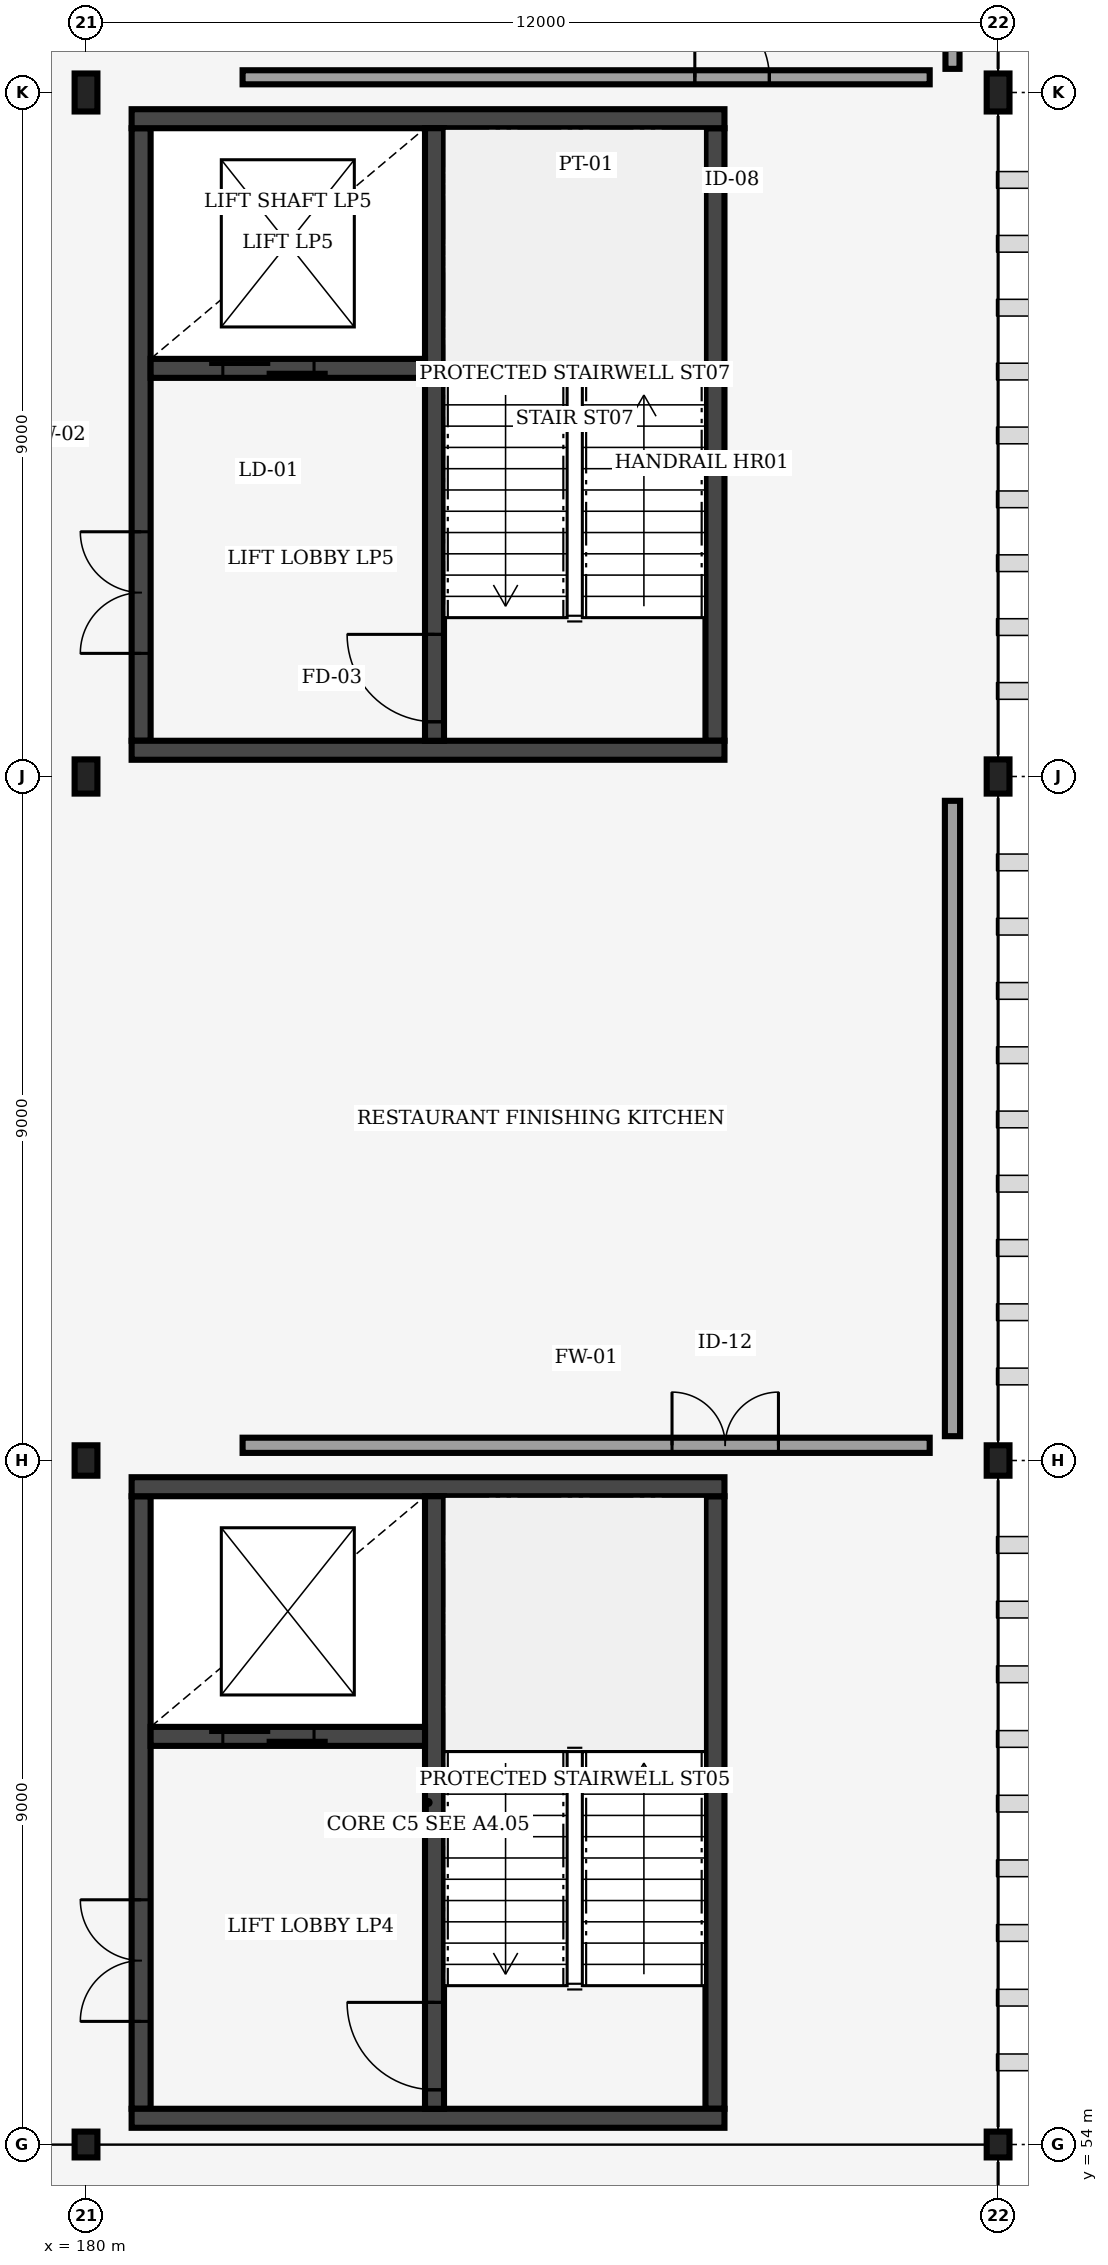
"""IFC4 building model, lengths in metres.
Left out: names, types, materials, properties, quantities, classifications, styles, units other than length and angle.
Written with IfcOpenShell. Run it as: python <this file> out.ifc"""

import sys

from ifc_helpers import new_model, si_unit, direction, frame, frame_2d, origin, origin_2d, place, context, subcontext, project, spatial, rectangle, i_section, extrude, element, fill, save


model = new_model("IFC4")
c1 = context("Model", 3, precision=1e-05, world=origin(), true_north=direction((0.0, 1.0)))
c2 = subcontext(c1, "Body", "Model", "MODEL_VIEW")
j1 = project(units=[si_unit("LENGTHUNIT", "METRE"), si_unit("PLANEANGLEUNIT", "RADIAN")], contexts=[c1])
p1 = place(None, origin())
s1 = spatial("IfcSite", under=j1, at=p1, CompositionType="ELEMENT")
p2 = place(p1, origin())
s2 = spatial("IfcBuilding", under=s1, at=p2, CompositionType="ELEMENT")
p3 = place(p2, frame((0.0, 0.0, 22.8)))
s3 = spatial("IfcBuildingStorey", under=s2, at=p3, CompositionType="ELEMENT", Elevation=22.8)
p4 = place(p3, frame((180.0, 54.0, 0.0), z_axis=(0.0, 0.0, 1.0), x_axis=(1.0, 0.0, 0.0)))
e1 = element("IfcColumn", 1, at=p4, inside=s3, PredefinedType="COLUMN", context=c2, shape_type="SweptSolid", body=[
    extrude(i_section(OverallWidth=0.3, OverallDepth=0.34, WebThickness=0.012, FlangeThickness=0.021, FilletRadius=0.027, at=origin_2d()), origin(), (0.0, 0.0, 1.0), 4.0),
])
p5 = place(p3, frame((180.0, 63.0, 0.0), z_axis=(0.0, 0.0, 1.0), x_axis=(1.0, 0.0, 0.0)))
e2 = element("IfcColumn", 2, at=p5, inside=s3, PredefinedType="COLUMN", context=c2, shape_type="SweptSolid", body=[
    extrude(i_section(OverallWidth=0.3, OverallDepth=0.4, WebThickness=0.013, FlangeThickness=0.024, FilletRadius=0.027, at=origin_2d()), origin(), (0.0, 0.0, 1.0), 4.0),
])
p6 = place(p3, frame((180.0, 72.0, 0.0), z_axis=(0.0, 0.0, 1.0), x_axis=(1.0, 0.0, 0.0)))
e3 = element("IfcColumn", 3, at=p6, inside=s3, PredefinedType="COLUMN", context=c2, shape_type="SweptSolid", body=[
    extrude(i_section(OverallWidth=0.3, OverallDepth=0.45, WebThickness=0.014, FlangeThickness=0.026, FilletRadius=0.027, at=origin_2d()), origin(), (0.0, 0.0, 1.0), 4.0),
])
p7 = place(p3, frame((180.0, 81.0, 0.0), z_axis=(0.0, 0.0, 1.0), x_axis=(1.0, 0.0, 0.0)))
e4 = element("IfcColumn", 4, at=p7, inside=s3, PredefinedType="COLUMN", context=c2, shape_type="SweptSolid", body=[
    extrude(i_section(OverallWidth=0.3, OverallDepth=0.5, WebThickness=0.014, FlangeThickness=0.028, FilletRadius=0.027, at=origin_2d()), origin(), (0.0, 0.0, 1.0), 4.0),
])
p8 = place(p3, frame((192.0, 54.0, 0.0), z_axis=(0.0, 0.0, 1.0), x_axis=(1.0, 0.0, 0.0)))
e5 = element("IfcColumn", 5, at=p8, inside=s3, PredefinedType="COLUMN", context=c2, shape_type="SweptSolid", body=[
    extrude(i_section(OverallWidth=0.3, OverallDepth=0.34, WebThickness=0.012, FlangeThickness=0.021, FilletRadius=0.027, at=origin_2d()), origin(), (0.0, 0.0, 1.0), 4.0),
])
p9 = place(p3, frame((192.0, 63.0, 0.0), z_axis=(0.0, 0.0, 1.0), x_axis=(1.0, 0.0, 0.0)))
e6 = element("IfcColumn", 6, at=p9, inside=s3, PredefinedType="COLUMN", context=c2, shape_type="SweptSolid", body=[
    extrude(i_section(OverallWidth=0.3, OverallDepth=0.4, WebThickness=0.013, FlangeThickness=0.024, FilletRadius=0.027, at=origin_2d()), origin(), (0.0, 0.0, 1.0), 4.0),
])
p10 = place(p3, frame((192.0, 72.0, 0.0), z_axis=(0.0, 0.0, 1.0), x_axis=(1.0, 0.0, 0.0)))
e7 = element("IfcColumn", 7, at=p10, inside=s3, PredefinedType="COLUMN", context=c2, shape_type="SweptSolid", body=[
    extrude(i_section(OverallWidth=0.3, OverallDepth=0.45, WebThickness=0.014, FlangeThickness=0.026, FilletRadius=0.027, at=origin_2d()), origin(), (0.0, 0.0, 1.0), 4.0),
])
p11 = place(p3, frame((192.0, 81.0, 0.0), z_axis=(0.0, 0.0, 1.0), x_axis=(1.0, 0.0, 0.0)))
e8 = element("IfcColumn", 8, at=p11, inside=s3, PredefinedType="COLUMN", context=c2, shape_type="SweptSolid", body=[
    extrude(i_section(OverallWidth=0.3, OverallDepth=0.5, WebThickness=0.014, FlangeThickness=0.028, FilletRadius=0.027, at=origin_2d()), origin(), (0.0, 0.0, 1.0), 4.0),
])
p12 = place(p3, frame((180.725, 54.47, 0.0), z_axis=(0.0, 0.0, 1.0), x_axis=(0.0, 1.0, 0.0)))
e9 = element("IfcWall", 9, at=p12, inside=s3, PredefinedType="SHEAR", context=c2, shape_type="SweptSolid", body=[
    extrude(rectangle(XDim=8.06, YDim=0.25, at=frame_2d((4.03, 0.0))), origin(), (0.0, 0.0, 1.0), 3.64),
])
p13 = place(p12, frame((1.15, 0.0, 0.0)))
e10 = element("IfcOpeningElement", 10, at=p13, cuts=e9, PredefinedType="OPENING", context=c2, shape_type="SweptSolid", body=[
    extrude(rectangle(XDim=1.6, YDim=2.2, at=frame_2d((0.8, 1.1))), frame((0.0, 0.135, 0.0), z_axis=(0.0, -1.0, 0.0), x_axis=(1.0, 0.0, 0.0)), (0.0, 0.0, 1.0), 0.27),
])
p14 = place(p3, frame((188.275, 54.47, 0.0), z_axis=(0.0, 0.0, 1.0), x_axis=(0.0, 1.0, 0.0)))
e11 = element("IfcWall", 11, at=p14, inside=s3, PredefinedType="SHEAR", context=c2, shape_type="SweptSolid", body=[
    extrude(rectangle(XDim=8.06, YDim=0.25, at=frame_2d((4.03, 0.0))), origin(), (0.0, 0.0, 1.0), 3.64),
])
for number, where, z_axis, x_axis in (
    (12, (180.6, 54.345, 0.0), (0.0, 0.0, 1.0), (1.0, 0.0, 0.0)),
    (13, (180.6, 62.655, 0.0), (0.0, 0.0, 1.0), (1.0, 0.0, 0.0)),
):
    element("IfcWall", number, at=place(p3, frame(where, z_axis=z_axis, x_axis=x_axis)), inside=s3, PredefinedType="SHEAR", context=c2, shape_type="SweptSolid", body=[
        extrude(rectangle(XDim=7.8, YDim=0.25, at=frame_2d((3.9, 0.0))), origin(), (0.0, 0.0, 1.0), 3.64),
    ])
p15 = place(p3, frame((184.585, 54.47, 0.0), z_axis=(0.0, 0.0, 1.0), x_axis=(0.0, 1.0, 0.0)))
e14 = element("IfcWall", 14, at=p15, inside=s3, PredefinedType="SHEAR", context=c2, shape_type="SweptSolid", body=[
    extrude(rectangle(XDim=8.06, YDim=0.25, at=frame_2d((4.03, 0.0))), origin(), (0.0, 0.0, 1.0), 3.64),
])
p16 = place(p15, frame((0.25, 0.0, 0.0)))
e15 = element("IfcOpeningElement", 15, at=p16, cuts=e14, PredefinedType="OPENING", context=c2, shape_type="SweptSolid", body=[
    extrude(rectangle(XDim=1.15, YDim=2.15, at=frame_2d((0.575, 1.075))), frame((0.0, 0.135, 0.0), z_axis=(0.0, -1.0, 0.0), x_axis=(1.0, 0.0, 0.0)), (0.0, 0.0, 1.0), 0.27),
])
p17 = place(p3, frame((180.85, 59.37, 0.0), z_axis=(0.0, 0.0, 1.0), x_axis=(1.0, 0.0, 0.0)))
e16 = element("IfcWall", 16, at=p17, inside=s3, PredefinedType="SHEAR", context=c2, shape_type="SweptSolid", body=[
    extrude(rectangle(XDim=3.61, YDim=0.25, at=frame_2d((1.805, 0.0))), origin(), (0.0, 0.0, 1.0), 3.64),
])
p18 = place(p17, frame((0.95, 0.0, 0.0)))
e17 = element("IfcOpeningElement", 17, at=p18, cuts=e16, PredefinedType="OPENING", context=c2, shape_type="SweptSolid", body=[
    extrude(rectangle(XDim=1.2, YDim=2.2, at=frame_2d((0.6, 1.1))), frame((0.0, 0.135, 0.0), z_axis=(0.0, -1.0, 0.0), x_axis=(1.0, 0.0, 0.0)), (0.0, 0.0, 1.0), 0.27),
])
p19 = place(p3, frame((180.725, 72.47, 0.0), z_axis=(0.0, 0.0, 1.0), x_axis=(0.0, 1.0, 0.0)))
e18 = element("IfcWall", 18, at=p19, inside=s3, PredefinedType="SHEAR", context=c2, shape_type="SweptSolid", body=[
    extrude(rectangle(XDim=8.06, YDim=0.25, at=frame_2d((4.03, 0.0))), origin(), (0.0, 0.0, 1.0), 3.64),
])
p20 = place(p19, frame((1.15, 0.0, 0.0)))
e19 = element("IfcOpeningElement", 19, at=p20, cuts=e18, PredefinedType="OPENING", context=c2, shape_type="SweptSolid", body=[
    extrude(rectangle(XDim=1.6, YDim=2.2, at=frame_2d((0.8, 1.1))), frame((0.0, 0.135, 0.0), z_axis=(0.0, -1.0, 0.0), x_axis=(1.0, 0.0, 0.0)), (0.0, 0.0, 1.0), 0.27),
])
p21 = place(p3, frame((188.275, 72.47, 0.0), z_axis=(0.0, 0.0, 1.0), x_axis=(0.0, 1.0, 0.0)))
e20 = element("IfcWall", 20, at=p21, inside=s3, PredefinedType="SHEAR", context=c2, shape_type="SweptSolid", body=[
    extrude(rectangle(XDim=8.06, YDim=0.25, at=frame_2d((4.03, 0.0))), origin(), (0.0, 0.0, 1.0), 3.64),
])
for number, where, z_axis, x_axis in (
    (21, (180.6, 72.345, 0.0), (0.0, 0.0, 1.0), (1.0, 0.0, 0.0)),
    (22, (180.6, 80.655, 0.0), (0.0, 0.0, 1.0), (1.0, 0.0, 0.0)),
):
    element("IfcWall", number, at=place(p3, frame(where, z_axis=z_axis, x_axis=x_axis)), inside=s3, PredefinedType="SHEAR", context=c2, shape_type="SweptSolid", body=[
        extrude(rectangle(XDim=7.8, YDim=0.25, at=frame_2d((3.9, 0.0))), origin(), (0.0, 0.0, 1.0), 3.64),
    ])
p22 = place(p3, frame((184.585, 72.47, 0.0), z_axis=(0.0, 0.0, 1.0), x_axis=(0.0, 1.0, 0.0)))
e23 = element("IfcWall", 23, at=p22, inside=s3, PredefinedType="SHEAR", context=c2, shape_type="SweptSolid", body=[
    extrude(rectangle(XDim=8.06, YDim=0.25, at=frame_2d((4.03, 0.0))), origin(), (0.0, 0.0, 1.0), 3.64),
])
p23 = place(p22, frame((0.25, 0.0, 0.0)))
e24 = element("IfcOpeningElement", 24, at=p23, cuts=e23, PredefinedType="OPENING", context=c2, shape_type="SweptSolid", body=[
    extrude(rectangle(XDim=1.15, YDim=2.15, at=frame_2d((0.575, 1.075))), frame((0.0, 0.135, 0.0), z_axis=(0.0, -1.0, 0.0), x_axis=(1.0, 0.0, 0.0)), (0.0, 0.0, 1.0), 0.27),
])
p24 = place(p3, frame((180.85, 77.37, 0.0), z_axis=(0.0, 0.0, 1.0), x_axis=(1.0, 0.0, 0.0)))
e25 = element("IfcWall", 25, at=p24, inside=s3, PredefinedType="SHEAR", context=c2, shape_type="SweptSolid", body=[
    extrude(rectangle(XDim=3.61, YDim=0.25, at=frame_2d((1.805, 0.0))), origin(), (0.0, 0.0, 1.0), 3.64),
])
p25 = place(p24, frame((0.95, 0.0, 0.0)))
e26 = element("IfcOpeningElement", 26, at=p25, cuts=e25, PredefinedType="OPENING", context=c2, shape_type="SweptSolid", body=[
    extrude(rectangle(XDim=1.2, YDim=2.2, at=frame_2d((0.6, 1.1))), frame((0.0, 0.135, 0.0), z_axis=(0.0, -1.0, 0.0), x_axis=(1.0, 0.0, 0.0)), (0.0, 0.0, 1.0), 0.27),
])
p26 = place(p3, frame((182.06, 63.2, 0.0), z_axis=(0.0, 0.0, 1.0), x_axis=(1.0, 0.0, 0.0)))
e27 = element("IfcWall", 27, at=p26, inside=s3, PredefinedType="SOLIDWALL", context=c2, shape_type="SweptSolid", body=[
    extrude(rectangle(XDim=9.04, YDim=0.2, at=frame_2d((4.52, 0.0))), origin(), (0.0, 0.0, 1.0), 2.8),
])
p27 = place(p26, frame((5.65, 0.0, 0.0)))
e28 = element("IfcOpeningElement", 28, at=p27, cuts=e27, PredefinedType="OPENING", context=c2, shape_type="SweptSolid", body=[
    extrude(rectangle(XDim=1.4, YDim=2.25, at=frame_2d((0.7, 1.125))), frame((0.0, 0.11, 0.0), z_axis=(0.0, -1.0, 0.0), x_axis=(1.0, 0.0, 0.0)), (0.0, 0.0, 1.0), 0.22),
])
p28 = place(p3, frame((191.4, 63.32, 0.0), z_axis=(0.0, 0.0, 1.0), x_axis=(0.0, 1.0, 0.0)))
e29 = element("IfcWall", 29, at=p28, inside=s3, PredefinedType="SOLIDWALL", context=c2, shape_type="SweptSolid", body=[
    extrude(rectangle(XDim=8.36, YDim=0.2, at=frame_2d((4.18, 0.0))), origin(), (0.0, 0.0, 1.0), 2.8),
])
p29 = place(p3, frame((182.06, 81.2, 0.0), z_axis=(0.0, 0.0, 1.0), x_axis=(1.0, 0.0, 0.0)))
e30 = element("IfcWall", 30, at=p29, inside=s3, PredefinedType="PARTITIONING", context=c2, shape_type="SweptSolid", body=[
    extrude(rectangle(XDim=9.04, YDim=0.185, at=frame_2d((4.52, 0.0))), origin(), (0.0, 0.0, 1.0), 2.8),
])
p30 = place(p29, frame((5.95, 0.0, 0.0)))
e31 = element("IfcOpeningElement", 31, at=p30, cuts=e30, PredefinedType="OPENING", context=c2, shape_type="SweptSolid", body=[
    extrude(rectangle(XDim=0.98, YDim=2.12, at=frame_2d((0.49, 1.06))), frame((0.0, 0.103, 0.0), z_axis=(0.0, -1.0, 0.0), x_axis=(1.0, 0.0, 0.0)), (0.0, 0.0, 1.0), 0.205),
])
p31 = place(p3, frame((191.4, 81.311, 0.0), z_axis=(0.0, 0.0, 1.0), x_axis=(0.0, 1.0, 0.0)))
e32 = element("IfcWall", 32, at=p31, inside=s3, PredefinedType="PARTITIONING", context=c2, shape_type="SweptSolid", body=[
    extrude(rectangle(XDim=8.378, YDim=0.185, at=frame_2d((4.189, 0.0))), origin(), (0.0, 0.0, 1.0), 2.8),
])
p32 = place(p16, origin())
e33 = element("IfcDoor", 33, at=p32, inside=s3, OperationType="SINGLE_SWING_RIGHT", PredefinedType="DOOR", context=c2, shape_type="SweptSolid", body=[
    extrude(rectangle(XDim=1.15, YDim=2.15, at=frame_2d((0.575, 1.075))), frame((0.0, 0.025, 0.0), z_axis=(0.0, -1.0, 0.0), x_axis=(1.0, 0.0, 0.0)), (0.0, 0.0, 1.0), 0.05),
])
fill(e15, e33)
p33 = place(p18, origin())
e34 = element("IfcDoor", 34, at=p33, inside=s3, OperationType="DOUBLE_DOOR_SLIDING", PredefinedType="DOOR", context=c2, shape_type="SweptSolid", body=[
    extrude(rectangle(XDim=1.2, YDim=2.2, at=frame_2d((0.6, 1.1))), frame((0.0, 0.025, 0.0), z_axis=(0.0, -1.0, 0.0), x_axis=(1.0, 0.0, 0.0)), (0.0, 0.0, 1.0), 0.05),
])
fill(e17, e34)
p34 = place(p13, origin())
e35 = element("IfcDoor", 35, at=p34, inside=s3, OperationType="DOUBLE_DOOR_SINGLE_SWING", PredefinedType="DOOR", context=c2, shape_type="SweptSolid", body=[
    extrude(rectangle(XDim=1.6, YDim=2.2, at=frame_2d((0.8, 1.1))), frame((0.0, 0.025, 0.0), z_axis=(0.0, -1.0, 0.0), x_axis=(1.0, 0.0, 0.0)), (0.0, 0.0, 1.0), 0.05),
])
fill(e10, e35)
p35 = place(p23, origin())
e36 = element("IfcDoor", 36, at=p35, inside=s3, OperationType="SINGLE_SWING_RIGHT", PredefinedType="DOOR", context=c2, shape_type="SweptSolid", body=[
    extrude(rectangle(XDim=1.15, YDim=2.15, at=frame_2d((0.575, 1.075))), frame((0.0, 0.025, 0.0), z_axis=(0.0, -1.0, 0.0), x_axis=(1.0, 0.0, 0.0)), (0.0, 0.0, 1.0), 0.05),
])
fill(e24, e36)
p36 = place(p25, origin())
e37 = element("IfcDoor", 37, at=p36, inside=s3, OperationType="DOUBLE_DOOR_SLIDING", PredefinedType="DOOR", context=c2, shape_type="SweptSolid", body=[
    extrude(rectangle(XDim=1.2, YDim=2.2, at=frame_2d((0.6, 1.1))), frame((0.0, 0.025, 0.0), z_axis=(0.0, -1.0, 0.0), x_axis=(1.0, 0.0, 0.0)), (0.0, 0.0, 1.0), 0.05),
])
fill(e26, e37)
p37 = place(p20, origin())
e38 = element("IfcDoor", 38, at=p37, inside=s3, OperationType="DOUBLE_DOOR_SINGLE_SWING", PredefinedType="DOOR", context=c2, shape_type="SweptSolid", body=[
    extrude(rectangle(XDim=1.6, YDim=2.2, at=frame_2d((0.8, 1.1))), frame((0.0, 0.025, 0.0), z_axis=(0.0, -1.0, 0.0), x_axis=(1.0, 0.0, 0.0)), (0.0, 0.0, 1.0), 0.05),
])
fill(e19, e38)
p38 = place(p27, origin())
e39 = element("IfcDoor", 39, at=p38, inside=s3, OperationType="DOUBLE_DOOR_SINGLE_SWING", PredefinedType="DOOR", context=c2, shape_type="SweptSolid", body=[
    extrude(rectangle(XDim=1.4, YDim=2.25, at=frame_2d((0.7, 1.125))), frame((0.0, 0.025, 0.0), z_axis=(0.0, -1.0, 0.0), x_axis=(1.0, 0.0, 0.0)), (0.0, 0.0, 1.0), 0.05),
])
fill(e28, e39)
p39 = place(p30, origin())
e40 = element("IfcDoor", 40, at=p39, inside=s3, OperationType="SINGLE_SWING_LEFT", PredefinedType="DOOR", context=c2, shape_type="SweptSolid", body=[
    extrude(rectangle(XDim=0.98, YDim=2.12, at=frame_2d((0.49, 1.06))), frame((0.0, 0.025, 0.0), z_axis=(0.0, -1.0, 0.0), x_axis=(1.0, 0.0, 0.0)), (0.0, 0.0, 1.0), 0.05),
])
fill(e31, e40)
save(model, sys.argv[1])
